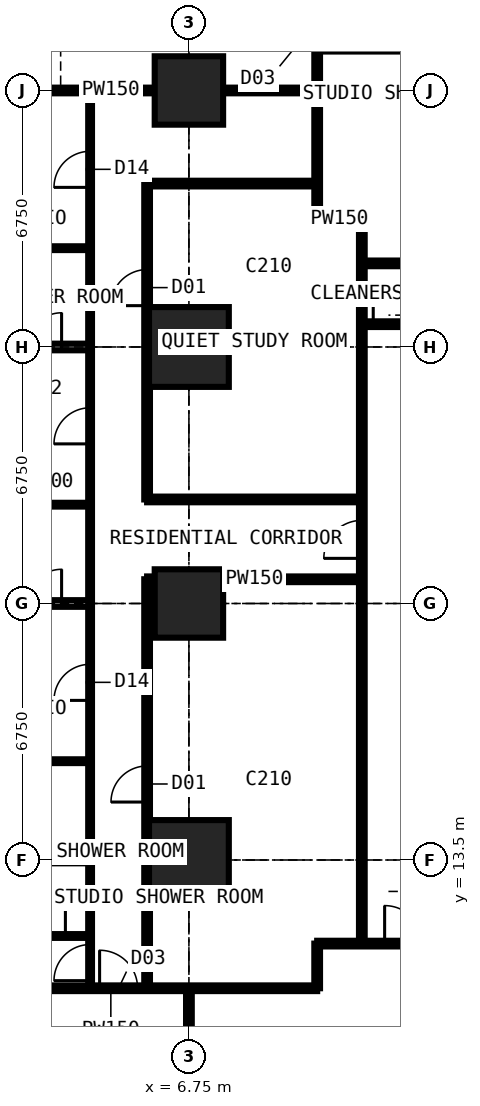
"""IFC4 building model, lengths in metres.
Left out: names, types, materials, properties, quantities, classifications, styles, units other than length and angle.
Written with IfcOpenShell. Run it as: python <this file> out.ifc"""

import sys

from ifc_helpers import new_model, si_unit, direction, frame, frame_2d, origin, origin_2d, place, context, subcontext, project, spatial, rectangle, extrude, element, fill, save


model = new_model("IFC4")
c1 = context("Model", 3, precision=1e-05, world=origin(), true_north=direction((0.0, 1.0)))
c2 = subcontext(c1, "Body", "Model", "MODEL_VIEW")
j1 = project(units=[si_unit("LENGTHUNIT", "METRE"), si_unit("PLANEANGLEUNIT", "RADIAN")], contexts=[c1])
p1 = place(None, origin())
s1 = spatial("IfcSite", under=j1, at=p1, CompositionType="ELEMENT")
p2 = place(p1, origin())
s2 = spatial("IfcBuilding", under=s1, at=p2, CompositionType="ELEMENT")
p3 = place(p2, frame((0.0, 0.0, 72.0)))
s3 = spatial("IfcBuildingStorey", under=s2, at=p3, CompositionType="ELEMENT", Elevation=72.0)
p4 = place(p3, frame((6.75, 13.5, 0.0), z_axis=(0.0, 0.0, 1.0), x_axis=(1.0, 0.0, 0.0)))
e1 = element("IfcColumn", 1, at=p4, inside=s3, PredefinedType="COLUMN", context=c2, shape_type="SweptSolid", body=[
    extrude(rectangle(XDim=2.1, YDim=2.1, at=origin_2d()), origin(), (0.0, 0.0, 1.0), 3.6),
])
p5 = place(p3, frame((6.75, 20.25, 0.0), z_axis=(0.0, 0.0, 1.0), x_axis=(1.0, 0.0, 0.0)))
e2 = element("IfcColumn", 2, at=p5, inside=s3, PredefinedType="COLUMN", context=c2, shape_type="SweptSolid", body=[
    extrude(rectangle(XDim=1.8, YDim=1.8, at=origin_2d()), origin(), (0.0, 0.0, 1.0), 3.6),
])
p6 = place(p3, frame((6.75, 27.0, 0.0), z_axis=(0.0, 0.0, 1.0), x_axis=(1.0, 0.0, 0.0)))
e3 = element("IfcColumn", 3, at=p6, inside=s3, PredefinedType="COLUMN", context=c2, shape_type="SweptSolid", body=[
    extrude(rectangle(XDim=2.1, YDim=2.1, at=origin_2d()), origin(), (0.0, 0.0, 1.0), 3.6),
])
p7 = place(p3, frame((6.75, 33.75, 0.0), z_axis=(0.0, 0.0, 1.0), x_axis=(1.0, 0.0, 0.0)))
e4 = element("IfcColumn", 4, at=p7, inside=s3, PredefinedType="COLUMN", context=c2, shape_type="SweptSolid", body=[
    extrude(rectangle(XDim=1.8, YDim=1.8, at=origin_2d()), origin(), (0.0, 0.0, 1.0), 3.6),
])
p8 = place(p3, frame((-0.734, 10.125, 0.0), z_axis=(0.0, 0.0, 1.0), x_axis=(1.0, 0.0, 0.0)))
e5 = element("IfcWall", 5, at=p8, inside=s3, PredefinedType="PARTITIONING", context=c2, shape_type="SweptSolid", body=[
    extrude(rectangle(XDim=10.859, YDim=0.15, at=frame_2d((5.429, 0.0))), origin(), (0.0, 0.0, 1.0), 3.3),
])
p9 = place(p8, frame((5.134, 0.0, 0.0)))
e6 = element("IfcOpeningElement", 6, at=p9, cuts=e5, PredefinedType="OPENING", context=c2, shape_type="SweptSolid", body=[
    extrude(rectangle(XDim=1.0, YDim=2.2, at=frame_2d((0.5, 1.1))), frame((0.0, 0.085, 0.0), z_axis=(0.0, -1.0, 0.0), x_axis=(1.0, 0.0, 0.0)), (0.0, 0.0, 1.0), 0.17),
])
p10 = place(p3, frame((-0.734, 13.5, 0.0), z_axis=(0.0, 0.0, 1.0), x_axis=(1.0, 0.0, 0.0)))
e7 = element("IfcWall", 7, at=p10, inside=s3, PredefinedType="PARTITIONING", context=c2, shape_type="SweptSolid", body=[
    extrude(rectangle(XDim=4.884, YDim=0.175, at=frame_2d((2.442, 0.0))), origin(), (0.0, 0.0, 1.0), 2.802),
])
p11 = place(p3, frame((-0.734, 20.25, 0.0), z_axis=(0.0, 0.0, 1.0), x_axis=(1.0, 0.0, 0.0)))
e8 = element("IfcWall", 8, at=p11, inside=s3, PredefinedType="PARTITIONING", context=c2, shape_type="SweptSolid", body=[
    extrude(rectangle(XDim=4.884, YDim=0.175, at=frame_2d((2.442, 0.0))), origin(), (0.0, 0.0, 1.0), 2.802),
])
p12 = place(p11, frame((3.234, 0.0, 0.0)))
e9 = element("IfcOpeningElement", 9, at=p12, cuts=e8, PredefinedType="OPENING", context=c2, shape_type="SweptSolid", body=[
    extrude(rectangle(XDim=0.9, YDim=2.2, at=frame_2d((0.45, 1.1))), frame((0.0, 0.097, 0.0), z_axis=(0.0, -1.0, 0.0), x_axis=(1.0, 0.0, 0.0)), (0.0, 0.0, 1.0), 0.195),
])
p13 = place(p3, frame((-0.734, 27.0, 0.0), z_axis=(0.0, 0.0, 1.0), x_axis=(1.0, 0.0, 0.0)))
e10 = element("IfcWall", 10, at=p13, inside=s3, PredefinedType="PARTITIONING", context=c2, shape_type="SweptSolid", body=[
    extrude(rectangle(XDim=4.884, YDim=0.175, at=frame_2d((2.442, 0.0))), origin(), (0.0, 0.0, 1.0), 2.802),
])
p14 = place(p13, frame((3.234, 0.0, 0.0)))
e11 = element("IfcOpeningElement", 11, at=p14, cuts=e10, PredefinedType="OPENING", context=c2, shape_type="SweptSolid", body=[
    extrude(rectangle(XDim=0.9, YDim=2.2, at=frame_2d((0.45, 1.1))), frame((0.0, 0.097, 0.0), z_axis=(0.0, -1.0, 0.0), x_axis=(1.0, 0.0, 0.0)), (0.0, 0.0, 1.0), 0.195),
])
p15 = place(p3, frame((-0.734, 33.75, 0.0), z_axis=(0.0, 0.0, 1.0), x_axis=(1.0, 0.0, 0.0)))
e12 = element("IfcWall", 12, at=p15, inside=s3, PredefinedType="PARTITIONING", context=c2, shape_type="SweptSolid", body=[
    extrude(rectangle(XDim=10.859, YDim=0.15, at=frame_2d((5.429, 0.0))), origin(), (0.0, 0.0, 1.0), 2.802),
])
for number, where, z_axis, x_axis in (
    (13, (1.75, 16.1, 0.0), (0.0, 0.0, 1.0), (1.0, 0.0, 0.0)),
    (14, (1.75, 22.85, 0.0), (0.0, 0.0, 1.0), (1.0, 0.0, 0.0)),
    (15, (1.75, 29.6, 0.0), (0.0, 0.0, 1.0), (1.0, 0.0, 0.0)),
):
    element("IfcWall", number, at=place(p3, frame(where, z_axis=z_axis, x_axis=x_axis)), inside=s3, PredefinedType="PARTITIONING", context=c2, shape_type="SweptSolid", body=[
        extrude(rectangle(XDim=2.4, YDim=0.1, at=frame_2d((1.2, 0.0))), origin(), (0.0, 0.0, 1.0), 3.3),
    ])
p16 = place(p3, frame((1.95, 11.5, 0.0), z_axis=(0.0, 0.0, 1.0), x_axis=(1.0, 0.0, 0.0)))
e16 = element("IfcWall", 16, at=p16, inside=s3, PredefinedType="PARTITIONING", context=c2, shape_type="SweptSolid", body=[
    extrude(rectangle(XDim=2.2, YDim=0.1, at=frame_2d((1.1, 0.0))), origin(), (0.0, 0.0, 1.0), 3.3),
])
p17 = place(p16, frame((0.65, 0.0, 0.0)))
e17 = element("IfcOpeningElement", 17, at=p17, cuts=e16, PredefinedType="OPENING", context=c2, shape_type="SweptSolid", body=[
    extrude(rectangle(XDim=0.9, YDim=2.2, at=frame_2d((0.45, 1.1))), frame((0.0, 0.06, 0.0), z_axis=(0.0, -1.0, 0.0), x_axis=(1.0, 0.0, 0.0)), (0.0, 0.0, 1.0), 0.12),
])
p18 = place(p3, frame((4.15, 10.125, 0.0), z_axis=(0.0, 0.0, 1.0), x_axis=(0.0, 1.0, 0.0)))
e18 = element("IfcWall", 18, at=p18, inside=s3, PredefinedType="PARTITIONING", context=c2, shape_type="SweptSolid", body=[
    extrude(rectangle(XDim=23.625, YDim=0.1, at=frame_2d((11.812, 0.0))), origin(), (0.0, 0.0, 1.0), 3.3),
])
p19 = place(p18, frame((7.575, 0.0, 0.0)))
e19 = element("IfcOpeningElement", 19, at=p19, cuts=e18, PredefinedType="OPENING", context=c2, shape_type="SweptSolid", body=[
    extrude(rectangle(XDim=0.95, YDim=2.2, at=frame_2d((0.475, 1.1))), frame((0.0, 0.06, 0.0), z_axis=(0.0, -1.0, 0.0), x_axis=(1.0, 0.0, 0.0)), (0.0, 0.0, 1.0), 0.12),
])
p20 = place(p18, frame((14.325, 0.0, 0.0)))
e20 = element("IfcOpeningElement", 20, at=p20, cuts=e18, PredefinedType="OPENING", context=c2, shape_type="SweptSolid", body=[
    extrude(rectangle(XDim=0.95, YDim=2.2, at=frame_2d((0.475, 1.1))), frame((0.0, 0.06, 0.0), z_axis=(0.0, -1.0, 0.0), x_axis=(1.0, 0.0, 0.0)), (0.0, 0.0, 1.0), 0.12),
])
p21 = place(p18, frame((21.075, 0.0, 0.0)))
e21 = element("IfcOpeningElement", 21, at=p21, cuts=e18, PredefinedType="OPENING", context=c2, shape_type="SweptSolid", body=[
    extrude(rectangle(XDim=0.95, YDim=2.2, at=frame_2d((0.475, 1.1))), frame((0.0, 0.06, 0.0), z_axis=(0.0, -1.0, 0.0), x_axis=(1.0, 0.0, 0.0)), (0.0, 0.0, 1.0), 0.12),
])
p22 = place(p18, frame((0.2, 0.0, 0.0)))
e22 = element("IfcOpeningElement", 22, at=p22, cuts=e18, PredefinedType="OPENING", context=c2, shape_type="SweptSolid", body=[
    extrude(rectangle(XDim=0.95, YDim=2.2, at=frame_2d((0.475, 1.1))), frame((0.0, 0.06, 0.0), z_axis=(0.0, -1.0, 0.0), x_axis=(1.0, 0.0, 0.0)), (0.0, 0.0, 1.0), 0.12),
])
p23 = place(p3, frame((5.65, 10.125, 0.0), z_axis=(0.0, 0.0, 1.0), x_axis=(0.0, 1.0, 0.0)))
e23 = element("IfcWall", 23, at=p23, inside=s3, PredefinedType="PARTITIONING", context=c2, shape_type="SweptSolid", body=[
    extrude(rectangle(XDim=10.762, YDim=0.15, at=frame_2d((5.381, 0.0))), origin(), (0.0, 0.0, 1.0), 3.3),
])
p24 = place(p23, frame((4.9, 0.0, 0.0)))
e24 = element("IfcOpeningElement", 24, at=p24, cuts=e23, PredefinedType="OPENING", context=c2, shape_type="SweptSolid", body=[
    extrude(rectangle(XDim=0.95, YDim=2.2, at=frame_2d((0.475, 1.1))), frame((0.0, 0.085, 0.0), z_axis=(0.0, -1.0, 0.0), x_axis=(1.0, 0.0, 0.0)), (0.0, 0.0, 1.0), 0.17),
])
p25 = place(p3, frame((5.65, 20.887, 0.0), z_axis=(0.0, 0.0, 1.0), x_axis=(1.0, 0.0, 0.0)))
e25 = element("IfcWall", 25, at=p25, inside=s3, PredefinedType="PARTITIONING", context=c2, shape_type="SweptSolid", body=[
    extrude(rectangle(XDim=5.65, YDim=0.15, at=frame_2d((2.825, 0.0))), origin(), (0.0, 0.0, 1.0), 3.3),
])
p26 = place(p3, frame((5.65, 22.988, 0.0), z_axis=(0.0, 0.0, 1.0), x_axis=(0.0, 1.0, 0.0)))
e26 = element("IfcWall", 26, at=p26, inside=s3, PredefinedType="PARTITIONING", context=c2, shape_type="SweptSolid", body=[
    extrude(rectangle(XDim=8.312, YDim=0.15, at=frame_2d((4.156, 0.0))), origin(), (0.0, 0.0, 1.0), 3.3),
])
p27 = place(p26, frame((5.1, 0.0, 0.0)))
e27 = element("IfcOpeningElement", 27, at=p27, cuts=e26, PredefinedType="OPENING", context=c2, shape_type="SweptSolid", body=[
    extrude(rectangle(XDim=0.95, YDim=2.2, at=frame_2d((0.475, 1.1))), frame((0.0, 0.085, 0.0), z_axis=(0.0, -1.0, 0.0), x_axis=(1.0, 0.0, 0.0)), (0.0, 0.0, 1.0), 0.17),
])
p28 = place(p3, frame((5.65, 22.988, 0.0), z_axis=(0.0, 0.0, 1.0), x_axis=(1.0, 0.0, 0.0)))
e28 = element("IfcWall", 28, at=p28, inside=s3, PredefinedType="PARTITIONING", context=c2, shape_type="SweptSolid", body=[
    extrude(rectangle(XDim=5.65, YDim=0.15, at=frame_2d((2.825, 0.0))), origin(), (0.0, 0.0, 1.0), 3.3),
])
p29 = place(p3, frame((5.65, 31.3, 0.0), z_axis=(0.0, 0.0, 1.0), x_axis=(1.0, 0.0, 0.0)))
e29 = element("IfcWall", 29, at=p29, inside=s3, PredefinedType="PARTITIONING", context=c2, shape_type="SweptSolid", body=[
    extrude(rectangle(XDim=4.475, YDim=0.15, at=frame_2d((2.238, 0.0))), origin(), (0.0, 0.0, 1.0), 3.3),
])
p30 = place(p3, frame((6.75, -0.734, 0.0), z_axis=(0.0, 0.0, 1.0), x_axis=(0.0, 1.0, 0.0)))
e30 = element("IfcWall", 30, at=p30, inside=s3, PredefinedType="PARTITIONING", context=c2, shape_type="SweptSolid", body=[
    extrude(rectangle(XDim=10.859, YDim=0.15, at=frame_2d((5.429, 0.0))), origin(), (0.0, 0.0, 1.0), 2.802),
])
p31 = place(p3, frame((10.125, 10.125, 0.0), z_axis=(0.0, 0.0, 1.0), x_axis=(0.0, 1.0, 0.0)))
e31 = element("IfcWall", 31, at=p31, inside=s3, PredefinedType="PARTITIONING", context=c2, shape_type="SweptSolid", body=[
    extrude(rectangle(XDim=1.175, YDim=0.15, at=frame_2d((0.587, 0.0))), origin(), (0.0, 0.0, 1.0), 3.3),
])
p32 = place(p3, frame((10.125, 11.3, 0.0), z_axis=(0.0, 0.0, 1.0), x_axis=(1.0, 0.0, 0.0)))
e32 = element("IfcWall", 32, at=p32, inside=s3, PredefinedType="PARTITIONING", context=c2, shape_type="SweptSolid", body=[
    extrude(rectangle(XDim=20.675, YDim=0.15, at=frame_2d((10.337, 0.0))), origin(), (0.0, 0.0, 1.0), 3.3),
])
p33 = place(p32, frame((1.775, 0.0, 0.0)))
e33 = element("IfcOpeningElement", 33, at=p33, cuts=e32, PredefinedType="OPENING", context=c2, shape_type="SweptSolid", body=[
    extrude(rectangle(XDim=1.0, YDim=2.2, at=frame_2d((0.5, 1.1))), frame((0.0, 0.085, 0.0), z_axis=(0.0, -1.0, 0.0), x_axis=(1.0, 0.0, 0.0)), (0.0, 0.0, 1.0), 0.17),
])
p34 = place(p32, frame((11.312, 0.0, 0.0)))
e34 = element("IfcOpeningElement", 34, at=p34, cuts=e32, PredefinedType="OPENING", context=c2, shape_type="SweptSolid", body=[
    extrude(rectangle(XDim=1.0, YDim=2.2, at=frame_2d((0.5, 1.1))), frame((0.0, 0.085, 0.0), z_axis=(0.0, -1.0, 0.0), x_axis=(1.0, 0.0, 0.0)), (0.0, 0.0, 1.0), 0.17),
])
p35 = place(p3, frame((10.125, 30.375, 0.0), z_axis=(0.0, 0.0, 1.0), x_axis=(0.0, 1.0, 0.0)))
e35 = element("IfcWall", 35, at=p35, inside=s3, PredefinedType="PARTITIONING", context=c2, shape_type="SweptSolid", body=[
    extrude(rectangle(XDim=10.859, YDim=0.15, at=frame_2d((5.429, 0.0))), origin(), (0.0, 0.0, 1.0), 3.3),
])
p36 = place(p35, frame((4.725, 0.0, 0.0)))
e36 = element("IfcOpeningElement", 36, at=p36, cuts=e35, PredefinedType="OPENING", context=c2, shape_type="SweptSolid", body=[
    extrude(rectangle(XDim=1.0, YDim=2.2, at=frame_2d((0.5, 1.1))), frame((0.0, 0.085, 0.0), z_axis=(0.0, -1.0, 0.0), x_axis=(1.0, 0.0, 0.0)), (0.0, 0.0, 1.0), 0.17),
])
p37 = place(p3, frame((10.125, 30.375, 0.0), z_axis=(0.0, 0.0, 1.0), x_axis=(1.0, 0.0, 0.0)))
e37 = element("IfcWall", 37, at=p37, inside=s3, PredefinedType="PARTITIONING", context=c2, shape_type="SweptSolid", body=[
    extrude(rectangle(XDim=1.175, YDim=0.15, at=frame_2d((0.587, 0.0))), origin(), (0.0, 0.0, 1.0), 3.3),
])
p38 = place(p3, frame((11.3, 11.3, 0.0), z_axis=(0.0, 0.0, 1.0), x_axis=(0.0, 1.0, 0.0)))
e38 = element("IfcWall", 38, at=p38, inside=s3, PredefinedType="PARTITIONING", context=c2, shape_type="SweptSolid", body=[
    extrude(rectangle(XDim=19.075, YDim=0.15, at=frame_2d((9.538, 0.0))), origin(), (0.0, 0.0, 1.0), 3.3),
])
p39 = place(p38, frame((10.137, 0.0, 0.0)))
e39 = element("IfcOpeningElement", 39, at=p39, cuts=e38, PredefinedType="OPENING", context=c2, shape_type="SweptSolid", body=[
    extrude(rectangle(XDim=1.0, YDim=2.2, at=frame_2d((0.5, 1.1))), frame((0.0, 0.085, 0.0), z_axis=(0.0, -1.0, 0.0), x_axis=(1.0, 0.0, 0.0)), (0.0, 0.0, 1.0), 0.17),
])
p40 = place(p3, frame((11.3, 27.6, 0.0), z_axis=(0.0, 0.0, 1.0), x_axis=(1.0, 0.0, 0.0)))
e40 = element("IfcWall", 40, at=p40, inside=s3, PredefinedType="PARTITIONING", context=c2, shape_type="SweptSolid", body=[
    extrude(rectangle(XDim=1.6, YDim=0.15, at=frame_2d((0.8, 0.0))), origin(), (0.0, 0.0, 1.0), 2.7),
])
p41 = place(p40, frame((0.3, 0.0, 0.0)))
e41 = element("IfcOpeningElement", 41, at=p41, cuts=e40, PredefinedType="OPENING", context=c2, shape_type="SweptSolid", body=[
    extrude(rectangle(XDim=0.95, YDim=2.2, at=frame_2d((0.475, 1.1))), frame((0.0, 0.085, 0.0), z_axis=(0.0, -1.0, 0.0), x_axis=(1.0, 0.0, 0.0)), (0.0, 0.0, 1.0), 0.17),
])
p42 = place(p3, frame((11.3, 29.2, 0.0), z_axis=(0.0, 0.0, 1.0), x_axis=(1.0, 0.0, 0.0)))
e42 = element("IfcWall", 42, at=p42, inside=s3, PredefinedType="PARTITIONING", context=c2, shape_type="SweptSolid", body=[
    extrude(rectangle(XDim=19.075, YDim=0.15, at=frame_2d((9.538, 0.0))), origin(), (0.0, 0.0, 1.0), 3.3),
])
p43 = place(p42, frame((12.875, 0.0, 0.0)))
e43 = element("IfcOpeningElement", 43, at=p43, cuts=e42, PredefinedType="OPENING", context=c2, shape_type="SweptSolid", body=[
    extrude(rectangle(XDim=1.0, YDim=2.2, at=frame_2d((0.5, 1.1))), frame((0.0, 0.085, 0.0), z_axis=(0.0, -1.0, 0.0), x_axis=(1.0, 0.0, 0.0)), (0.0, 0.0, 1.0), 0.17),
])
p44 = place(p42, frame((10.438, 0.0, 0.0)))
e44 = element("IfcOpeningElement", 44, at=p44, cuts=e42, PredefinedType="OPENING", context=c2, shape_type="SweptSolid", body=[
    extrude(rectangle(XDim=1.0, YDim=2.2, at=frame_2d((0.5, 1.1))), frame((0.0, 0.085, 0.0), z_axis=(0.0, -1.0, 0.0), x_axis=(1.0, 0.0, 0.0)), (0.0, 0.0, 1.0), 0.17),
])
p45 = place(p42, frame((15.675, 0.0, 0.0)))
e45 = element("IfcOpeningElement", 45, at=p45, cuts=e42, PredefinedType="OPENING", context=c2, shape_type="SweptSolid", body=[
    extrude(rectangle(XDim=0.95, YDim=2.2, at=frame_2d((0.475, 1.1))), frame((0.0, 0.085, 0.0), z_axis=(0.0, -1.0, 0.0), x_axis=(1.0, 0.0, 0.0)), (0.0, 0.0, 1.0), 0.17),
])
p46 = place(p41, origin())
e46 = element("IfcDoor", 46, at=p46, inside=s3, OperationType="SINGLE_SWING_LEFT", PredefinedType="DOOR", context=c2, shape_type="SweptSolid", body=[
    extrude(rectangle(XDim=0.95, YDim=2.2, at=frame_2d((0.475, 1.1))), frame((0.0, 0.025, 0.0), z_axis=(0.0, -1.0, 0.0), x_axis=(1.0, 0.0, 0.0)), (0.0, 0.0, 1.0), 0.05),
])
fill(e41, e46)
p47 = place(p9, origin())
e47 = element("IfcDoor", 47, at=p47, inside=s3, OperationType="SINGLE_SWING_LEFT", PredefinedType="DOOR", context=c2, shape_type="SweptSolid", body=[
    extrude(rectangle(XDim=1.0, YDim=2.2, at=frame_2d((0.5, 1.1))), frame((0.0, 0.025, 0.0), z_axis=(0.0, -1.0, 0.0), x_axis=(1.0, 0.0, 0.0)), (0.0, 0.0, 1.0), 0.05),
])
fill(e6, e47)
p48 = place(p33, origin())
e48 = element("IfcDoor", 48, at=p48, inside=s3, OperationType="SINGLE_SWING_LEFT", PredefinedType="DOOR", context=c2, shape_type="SweptSolid", body=[
    extrude(rectangle(XDim=1.0, YDim=2.2, at=frame_2d((0.5, 1.1))), frame((0.0, 0.025, 0.0), z_axis=(0.0, -1.0, 0.0), x_axis=(1.0, 0.0, 0.0)), (0.0, 0.0, 1.0), 0.05),
])
fill(e33, e48)
p49 = place(p19, origin())
e49 = element("IfcDoor", 49, at=p49, inside=s3, OperationType="SINGLE_SWING_LEFT", PredefinedType="DOOR", context=c2, shape_type="SweptSolid", body=[
    extrude(rectangle(XDim=0.95, YDim=2.2, at=frame_2d((0.475, 1.1))), frame((0.0, 0.025, 0.0), z_axis=(0.0, -1.0, 0.0), x_axis=(1.0, 0.0, 0.0)), (0.0, 0.0, 1.0), 0.05),
])
fill(e19, e49)
p50 = place(p20, origin())
e50 = element("IfcDoor", 50, at=p50, inside=s3, OperationType="SINGLE_SWING_LEFT", PredefinedType="DOOR", context=c2, shape_type="SweptSolid", body=[
    extrude(rectangle(XDim=0.95, YDim=2.2, at=frame_2d((0.475, 1.1))), frame((0.0, 0.025, 0.0), z_axis=(0.0, -1.0, 0.0), x_axis=(1.0, 0.0, 0.0)), (0.0, 0.0, 1.0), 0.05),
])
fill(e20, e50)
p51 = place(p12, origin())
e51 = element("IfcDoor", 51, at=p51, inside=s3, OperationType="SINGLE_SWING_RIGHT", PredefinedType="DOOR", context=c2, shape_type="SweptSolid", body=[
    extrude(rectangle(XDim=0.9, YDim=2.2, at=frame_2d((0.45, 1.1))), frame((0.0, 0.025, 0.0), z_axis=(0.0, -1.0, 0.0), x_axis=(1.0, 0.0, 0.0)), (0.0, 0.0, 1.0), 0.05),
])
fill(e9, e51)
p52 = place(p21, origin())
e52 = element("IfcDoor", 52, at=p52, inside=s3, OperationType="SINGLE_SWING_LEFT", PredefinedType="DOOR", context=c2, shape_type="SweptSolid", body=[
    extrude(rectangle(XDim=0.95, YDim=2.2, at=frame_2d((0.475, 1.1))), frame((0.0, 0.025, 0.0), z_axis=(0.0, -1.0, 0.0), x_axis=(1.0, 0.0, 0.0)), (0.0, 0.0, 1.0), 0.05),
])
fill(e21, e52)
p53 = place(p14, origin())
e53 = element("IfcDoor", 53, at=p53, inside=s3, OperationType="SINGLE_SWING_RIGHT", PredefinedType="DOOR", context=c2, shape_type="SweptSolid", body=[
    extrude(rectangle(XDim=0.9, YDim=2.2, at=frame_2d((0.45, 1.1))), frame((0.0, 0.025, 0.0), z_axis=(0.0, -1.0, 0.0), x_axis=(1.0, 0.0, 0.0)), (0.0, 0.0, 1.0), 0.05),
])
fill(e11, e53)
p54 = place(p22, origin())
e54 = element("IfcDoor", 54, at=p54, inside=s3, OperationType="SINGLE_SWING_LEFT", PredefinedType="DOOR", context=c2, shape_type="SweptSolid", body=[
    extrude(rectangle(XDim=0.95, YDim=2.2, at=frame_2d((0.475, 1.1))), frame((0.0, 0.025, 0.0), z_axis=(0.0, -1.0, 0.0), x_axis=(1.0, 0.0, 0.0)), (0.0, 0.0, 1.0), 0.05),
])
fill(e22, e54)
p55 = place(p17, origin())
e55 = element("IfcDoor", 55, at=p55, inside=s3, OperationType="SINGLE_SWING_RIGHT", PredefinedType="DOOR", context=c2, shape_type="SweptSolid", body=[
    extrude(rectangle(XDim=0.9, YDim=2.2, at=frame_2d((0.45, 1.1))), frame((0.0, 0.025, 0.0), z_axis=(0.0, -1.0, 0.0), x_axis=(1.0, 0.0, 0.0)), (0.0, 0.0, 1.0), 0.05),
])
fill(e17, e55)
p56 = place(p39, origin())
e56 = element("IfcDoor", 56, at=p56, inside=s3, OperationType="SINGLE_SWING_LEFT", PredefinedType="DOOR", context=c2, shape_type="SweptSolid", body=[
    extrude(rectangle(XDim=1.0, YDim=2.2, at=frame_2d((0.5, 1.1))), frame((0.0, 0.025, 0.0), z_axis=(0.0, -1.0, 0.0), x_axis=(1.0, 0.0, 0.0)), (0.0, 0.0, 1.0), 0.05),
])
fill(e39, e56)
p57 = place(p24, origin())
e57 = element("IfcDoor", 57, at=p57, inside=s3, OperationType="SINGLE_SWING_LEFT", PredefinedType="DOOR", context=c2, shape_type="SweptSolid", body=[
    extrude(rectangle(XDim=0.95, YDim=2.2, at=frame_2d((0.475, 1.1))), frame((0.0, 0.025, 0.0), z_axis=(0.0, -1.0, 0.0), x_axis=(1.0, 0.0, 0.0)), (0.0, 0.0, 1.0), 0.05),
])
fill(e24, e57)
p58 = place(p27, origin())
e58 = element("IfcDoor", 58, at=p58, inside=s3, OperationType="SINGLE_SWING_LEFT", PredefinedType="DOOR", context=c2, shape_type="SweptSolid", body=[
    extrude(rectangle(XDim=0.95, YDim=2.2, at=frame_2d((0.475, 1.1))), frame((0.0, 0.025, 0.0), z_axis=(0.0, -1.0, 0.0), x_axis=(1.0, 0.0, 0.0)), (0.0, 0.0, 1.0), 0.05),
])
fill(e27, e58)
save(model, sys.argv[1])
